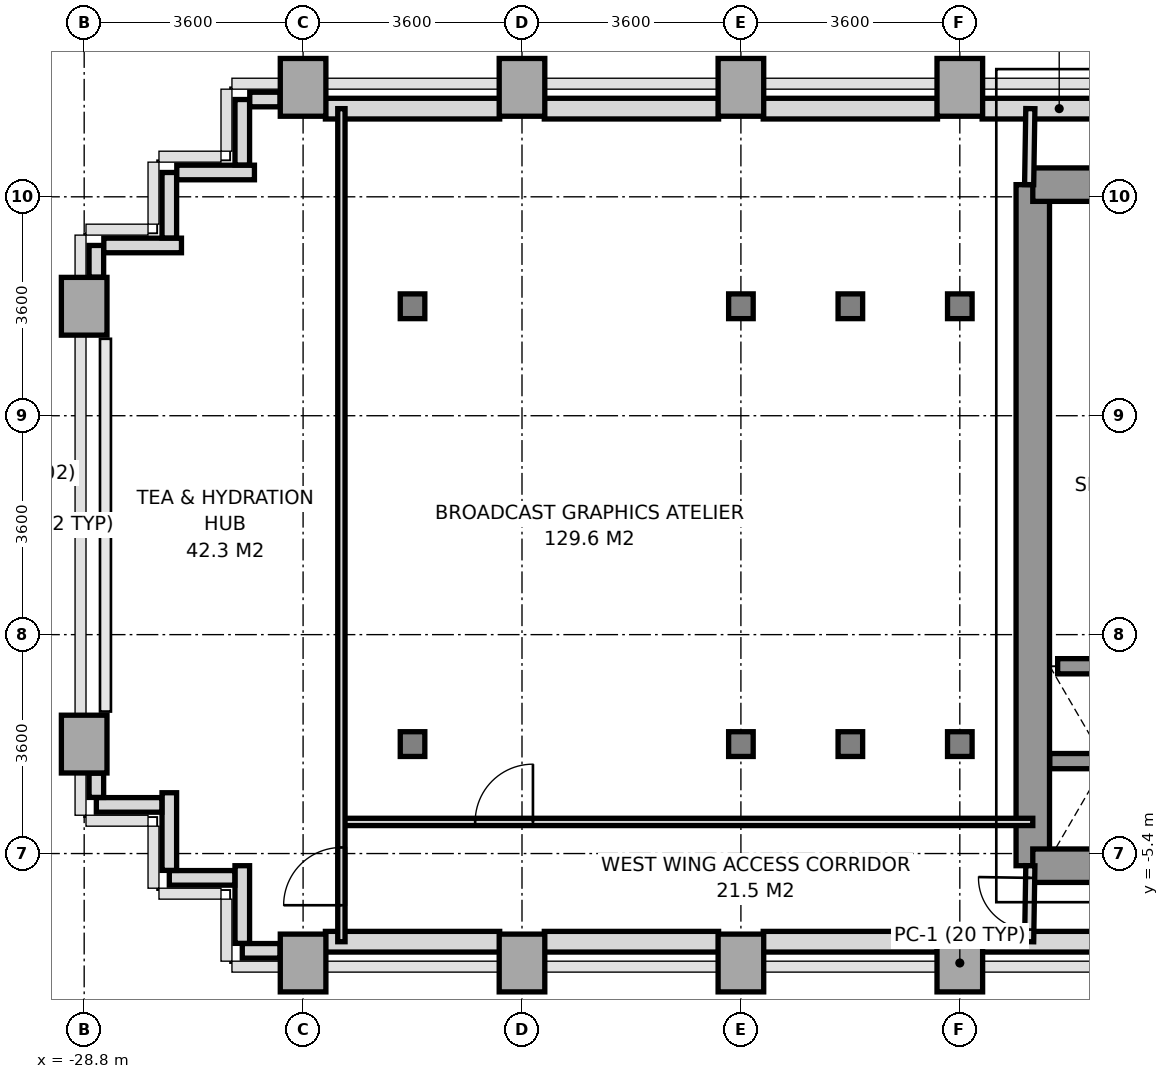
"""IFC4 building model, lengths in metres.
Left out: names, types, materials, properties, quantities, classifications, styles, units other than length and angle.
Written with IfcOpenShell. Run it as: python <this file> out.ifc"""

import sys

from ifc_helpers import new_model, si_unit, direction, frame, frame_2d, origin, origin_2d, place, context, subcontext, project, spatial, rectangle, i_section, extrude, source, transform, mapped, element, fill, save


model = new_model("IFC4")
c1 = context("Model", 3, precision=1e-05, world=origin(), true_north=direction((0.0, 1.0)))
c2 = subcontext(c1, "Body", "Model", "MODEL_VIEW")
j1 = project(units=[si_unit("LENGTHUNIT", "METRE"), si_unit("PLANEANGLEUNIT", "RADIAN")], contexts=[c1])
p1 = place(None, origin())
s1 = spatial("IfcSite", under=j1, at=p1, CompositionType="ELEMENT")
p2 = place(p1, origin())
s2 = spatial("IfcBuilding", under=s1, at=p2, CompositionType="ELEMENT")
p3 = place(p2, frame((0.0, 0.0, 54.4)))
s3 = spatial("IfcBuildingStorey", under=s2, at=p3, CompositionType="ELEMENT", Elevation=54.4)
m1 = source(origin(), c2, "Body", "SweptSolid", [
    extrude(rectangle(XDim=0.75, YDim=0.95, at=origin_2d()), origin(), (0.0, 0.0, 1.0), 3.2),
])
for number, where, z_axis, x_axis in (
    (1, (-28.8, -3.6, 0.0), (0.0, 0.0, 1.0), (1.0, 0.0, 0.0)),
    (2, (-28.8, 3.6, 0.0), (0.0, 0.0, 1.0), (1.0, 0.0, 0.0)),
    (3, (-25.2, -7.2, 0.0), (0.0, 0.0, 1.0), (1.0, 0.0, 0.0)),
    (4, (-25.2, 7.2, 0.0), (0.0, 0.0, 1.0), (1.0, 0.0, 0.0)),
):
    element("IfcColumn", number, at=place(p3, frame(where, z_axis=z_axis, x_axis=x_axis)), inside=s3, PredefinedType="COLUMN", context=c2, shape_type="MappedRepresentation", body=[
        mapped(m1, transform((0.0, 0.0, 0.0), x_axis=(1.0, 0.0, 0.0), y_axis=(0.0, 1.0, 0.0), z_axis=(0.0, 0.0, 1.0), scale=1.0)),
    ])
m2 = source(origin(), c2, "Body", "SweptSolid", [
    extrude(i_section(OverallWidth=0.404, OverallDepth=0.407, WebThickness=0.022, FlangeThickness=0.035, at=origin_2d()), origin(), (0.0, 0.0, 1.0), 3.2),
])
for number, where, z_axis, x_axis in (
    (5, (-23.4, -3.6, 0.0), (0.0, 0.0, 1.0), (1.0, 0.0, 0.0)),
    (6, (-23.4, 3.6, 0.0), (0.0, 0.0, 1.0), (1.0, 0.0, 0.0)),
):
    element("IfcColumn", number, at=place(p3, frame(where, z_axis=z_axis, x_axis=x_axis)), inside=s3, PredefinedType="COLUMN", context=c2, shape_type="MappedRepresentation", body=[
        mapped(m2, transform((0.0, 0.0, 0.0), x_axis=(1.0, 0.0, 0.0), y_axis=(0.0, 1.0, 0.0), z_axis=(0.0, 0.0, 1.0), scale=1.0)),
    ])
for number, where, z_axis, x_axis in (
    (7, (-21.6, -7.2, 0.0), (0.0, 0.0, 1.0), (1.0, 0.0, 0.0)),
    (8, (-21.6, 7.2, 0.0), (0.0, 0.0, 1.0), (1.0, 0.0, 0.0)),
    (9, (-18.0, -7.2, 0.0), (0.0, 0.0, 1.0), (1.0, 0.0, 0.0)),
):
    element("IfcColumn", number, at=place(p3, frame(where, z_axis=z_axis, x_axis=x_axis)), inside=s3, PredefinedType="COLUMN", context=c2, shape_type="MappedRepresentation", body=[
        mapped(m1, transform((0.0, 0.0, 0.0), x_axis=(1.0, 0.0, 0.0), y_axis=(0.0, 1.0, 0.0), z_axis=(0.0, 0.0, 1.0), scale=1.0)),
    ])
for number, where, z_axis, x_axis in (
    (10, (-18.0, -3.6, 0.0), (0.0, 0.0, 1.0), (1.0, 0.0, 0.0)),
    (11, (-18.0, 3.6, 0.0), (0.0, 0.0, 1.0), (1.0, 0.0, 0.0)),
):
    element("IfcColumn", number, at=place(p3, frame(where, z_axis=z_axis, x_axis=x_axis)), inside=s3, PredefinedType="COLUMN", context=c2, shape_type="MappedRepresentation", body=[
        mapped(m2, transform((0.0, 0.0, 0.0), x_axis=(1.0, 0.0, 0.0), y_axis=(0.0, 1.0, 0.0), z_axis=(0.0, 0.0, 1.0), scale=1.0)),
    ])
p4 = place(p3, frame((-18.0, 7.2, 0.0), z_axis=(0.0, 0.0, 1.0), x_axis=(1.0, 0.0, 0.0)))
e12 = element("IfcColumn", 12, at=p4, inside=s3, PredefinedType="COLUMN", context=c2, shape_type="MappedRepresentation", body=[
    mapped(m1, transform((0.0, 0.0, 0.0), x_axis=(1.0, 0.0, 0.0), y_axis=(0.0, 1.0, 0.0), z_axis=(0.0, 0.0, 1.0), scale=1.0)),
])
for number, where, z_axis, x_axis in (
    (13, (-16.2, -3.6, 0.0), (0.0, 0.0, 1.0), (1.0, 0.0, 0.0)),
    (14, (-16.2, 3.6, 0.0), (0.0, 0.0, 1.0), (1.0, 0.0, 0.0)),
):
    element("IfcColumn", number, at=place(p3, frame(where, z_axis=z_axis, x_axis=x_axis)), inside=s3, PredefinedType="COLUMN", context=c2, shape_type="MappedRepresentation", body=[
        mapped(m2, transform((0.0, 0.0, 0.0), x_axis=(1.0, 0.0, 0.0), y_axis=(0.0, 1.0, 0.0), z_axis=(0.0, 0.0, 1.0), scale=1.0)),
    ])
p5 = place(p3, frame((-14.4, -7.2, 0.0), z_axis=(0.0, 0.0, 1.0), x_axis=(1.0, 0.0, 0.0)))
e15 = element("IfcColumn", 15, at=p5, inside=s3, PredefinedType="COLUMN", context=c2, shape_type="MappedRepresentation", body=[
    mapped(m1, transform((0.0, 0.0, 0.0), x_axis=(1.0, 0.0, 0.0), y_axis=(0.0, 1.0, 0.0), z_axis=(0.0, 0.0, 1.0), scale=1.0)),
])
for number, where, z_axis, x_axis in (
    (16, (-14.4, -3.6, 0.0), (0.0, 0.0, 1.0), (1.0, 0.0, 0.0)),
    (17, (-14.4, 3.6, 0.0), (0.0, 0.0, 1.0), (1.0, 0.0, 0.0)),
):
    element("IfcColumn", number, at=place(p3, frame(where, z_axis=z_axis, x_axis=x_axis)), inside=s3, PredefinedType="COLUMN", context=c2, shape_type="MappedRepresentation", body=[
        mapped(m2, transform((0.0, 0.0, 0.0), x_axis=(1.0, 0.0, 0.0), y_axis=(0.0, 1.0, 0.0), z_axis=(0.0, 0.0, 1.0), scale=1.0)),
    ])
p6 = place(p3, frame((-14.4, 7.2, 0.0), z_axis=(0.0, 0.0, 1.0), x_axis=(1.0, 0.0, 0.0)))
e18 = element("IfcColumn", 18, at=p6, inside=s3, PredefinedType="COLUMN", context=c2, shape_type="MappedRepresentation", body=[
    mapped(m1, transform((0.0, 0.0, 0.0), x_axis=(1.0, 0.0, 0.0), y_axis=(0.0, 1.0, 0.0), z_axis=(0.0, 0.0, 1.0), scale=1.0)),
])
for number, where, z_axis, x_axis in (
    (19, (-24.833, 6.85, 0.0), (0.0, 0.0, 1.0), (1.0, 0.0, 0.0)),
    (20, (-21.233, 6.85, 0.0), (0.0, 0.0, 1.0), (1.0, 0.0, 0.0)),
    (21, (-17.633, 6.85, 0.0), (0.0, 0.0, 1.0), (1.0, 0.0, 0.0)),
):
    element("IfcWall", number, at=place(p3, frame(where, z_axis=z_axis, x_axis=x_axis)), inside=s3, PredefinedType="SOLIDWALL", context=c2, shape_type="SweptSolid", body=[
        extrude(rectangle(XDim=2.866, YDim=0.34, at=frame_2d((1.433, 0.0))), origin(), (0.0, 0.0, 1.0), 2.45),
    ])
p7 = place(p3, frame((-14.033, 6.85, 0.0), z_axis=(0.0, 0.0, 1.0), x_axis=(1.0, 0.0, 0.0)))
e22 = element("IfcWall", 22, at=p7, inside=s3, PredefinedType="SOLIDWALL", context=c2, shape_type="SweptSolid", body=[
    extrude(rectangle(XDim=2.535, YDim=0.34, at=frame_2d((1.268, 0.0))), origin(), (0.0, 0.0, 1.0), 3.2),
])
for number, where, z_axis, x_axis in (
    (23, (-24.833, -6.85, 0.0), (0.0, 0.0, 1.0), (1.0, 0.0, 0.0)),
    (24, (-21.233, -6.85, 0.0), (0.0, 0.0, 1.0), (1.0, 0.0, 0.0)),
    (25, (-17.633, -6.85, 0.0), (0.0, 0.0, 1.0), (1.0, 0.0, 0.0)),
):
    element("IfcWall", number, at=place(p3, frame(where, z_axis=z_axis, x_axis=x_axis)), inside=s3, PredefinedType="SOLIDWALL", context=c2, shape_type="SweptSolid", body=[
        extrude(rectangle(XDim=2.866, YDim=0.34, at=frame_2d((1.433, 0.0))), origin(), (0.0, 0.0, 1.0), 2.45),
    ])
p8 = place(p3, frame((-14.033, -6.85, 0.0), z_axis=(0.0, 0.0, 1.0), x_axis=(1.0, 0.0, 0.0)))
e26 = element("IfcWall", 26, at=p8, inside=s3, PredefinedType="SOLIDWALL", context=c2, shape_type="SweptSolid", body=[
    extrude(rectangle(XDim=2.283, YDim=0.34, at=frame_2d((1.142, 0.0))), origin(), (0.0, 0.0, 1.0), 3.2),
])
p9 = place(p3, frame((-25.578, -7.0, 0.0), z_axis=(0.0, 0.0, 1.0), x_axis=(-1.0, 0.0, 0.0)))
e27 = element("IfcWall", 27, at=p9, inside=s3, PredefinedType="PARAPET", context=c2, shape_type="SweptSolid", body=[
    extrude(rectangle(XDim=0.622, YDim=0.24, at=frame_2d((0.311, 0.0))), origin(), (0.0, 0.0, 1.0), 1.15),
])
p10 = place(p3, frame((-26.2, -6.877, 0.0), z_axis=(0.0, 0.0, 1.0), x_axis=(0.0, 1.0, 0.0)))
e28 = element("IfcWall", 28, at=p10, inside=s3, PredefinedType="PARAPET", context=c2, shape_type="SweptSolid", body=[
    extrude(rectangle(XDim=1.277, YDim=0.24, at=frame_2d((0.638, 0.0))), origin(), (0.0, 0.0, 1.0), 1.15),
])
p11 = place(p3, frame((-26.323, -5.8, 0.0), z_axis=(0.0, 0.0, 1.0), x_axis=(-1.0, 0.0, 0.0)))
e29 = element("IfcWall", 29, at=p11, inside=s3, PredefinedType="PARAPET", context=c2, shape_type="SweptSolid", body=[
    extrude(rectangle(XDim=1.077, YDim=0.24, at=frame_2d((0.539, 0.0))), origin(), (0.0, 0.0, 1.0), 1.15),
])
p12 = place(p3, frame((-27.4, -5.677, 0.0), z_axis=(0.0, 0.0, 1.0), x_axis=(0.0, 1.0, 0.0)))
e30 = element("IfcWall", 30, at=p12, inside=s3, PredefinedType="PARAPET", context=c2, shape_type="SweptSolid", body=[
    extrude(rectangle(XDim=1.277, YDim=0.24, at=frame_2d((0.639, 0.0))), origin(), (0.0, 0.0, 1.0), 1.15),
])
p13 = place(p3, frame((-27.523, -4.6, 0.0), z_axis=(0.0, 0.0, 1.0), x_axis=(-1.0, 0.0, 0.0)))
e31 = element("IfcWall", 31, at=p13, inside=s3, PredefinedType="PARAPET", context=c2, shape_type="SweptSolid", body=[
    extrude(rectangle(XDim=1.077, YDim=0.24, at=frame_2d((0.539, 0.0))), origin(), (0.0, 0.0, 1.0), 1.15),
])
p14 = place(p3, frame((-28.6, -4.477, 0.0), z_axis=(0.0, 0.0, 1.0), x_axis=(0.0, 1.0, 0.0)))
e32 = element("IfcWall", 32, at=p14, inside=s3, PredefinedType="PARAPET", context=c2, shape_type="SweptSolid", body=[
    extrude(rectangle(XDim=0.399, YDim=0.24, at=frame_2d((0.2, 0.0))), origin(), (0.0, 0.0, 1.0), 1.15),
])
p15 = place(p3, frame((-28.6, 4.078, 0.0), z_axis=(0.0, 0.0, 1.0), x_axis=(0.0, 1.0, 0.0)))
e33 = element("IfcWall", 33, at=p15, inside=s3, PredefinedType="PARAPET", context=c2, shape_type="SweptSolid", body=[
    extrude(rectangle(XDim=0.522, YDim=0.24, at=frame_2d((0.261, 0.0))), origin(), (0.0, 0.0, 1.0), 1.15),
])
p16 = place(p3, frame((-28.477, 4.6, 0.0), z_axis=(0.0, 0.0, 1.0), x_axis=(1.0, 0.0, 0.0)))
e34 = element("IfcWall", 34, at=p16, inside=s3, PredefinedType="PARAPET", context=c2, shape_type="SweptSolid", body=[
    extrude(rectangle(XDim=1.277, YDim=0.24, at=frame_2d((0.639, 0.0))), origin(), (0.0, 0.0, 1.0), 1.15),
])
p17 = place(p3, frame((-27.4, 4.723, 0.0), z_axis=(0.0, 0.0, 1.0), x_axis=(0.0, 1.0, 0.0)))
e35 = element("IfcWall", 35, at=p17, inside=s3, PredefinedType="PARAPET", context=c2, shape_type="SweptSolid", body=[
    extrude(rectangle(XDim=1.077, YDim=0.24, at=frame_2d((0.539, 0.0))), origin(), (0.0, 0.0, 1.0), 1.15),
])
p18 = place(p3, frame((-27.277, 5.8, 0.0), z_axis=(0.0, 0.0, 1.0), x_axis=(1.0, 0.0, 0.0)))
e36 = element("IfcWall", 36, at=p18, inside=s3, PredefinedType="PARAPET", context=c2, shape_type="SweptSolid", body=[
    extrude(rectangle(XDim=1.277, YDim=0.24, at=frame_2d((0.639, 0.0))), origin(), (0.0, 0.0, 1.0), 1.15),
])
p19 = place(p3, frame((-26.2, 5.923, 0.0), z_axis=(0.0, 0.0, 1.0), x_axis=(0.0, 1.0, 0.0)))
e37 = element("IfcWall", 37, at=p19, inside=s3, PredefinedType="PARAPET", context=c2, shape_type="SweptSolid", body=[
    extrude(rectangle(XDim=1.077, YDim=0.24, at=frame_2d((0.539, 0.0))), origin(), (0.0, 0.0, 1.0), 1.15),
])
p20 = place(p3, frame((-26.077, 7.0, 0.0), z_axis=(0.0, 0.0, 1.0), x_axis=(1.0, 0.0, 0.0)))
e38 = element("IfcWall", 38, at=p20, inside=s3, PredefinedType="PARAPET", context=c2, shape_type="SweptSolid", body=[
    extrude(rectangle(XDim=0.499, YDim=0.24, at=frame_2d((0.25, 0.0))), origin(), (0.0, 0.0, 1.0), 1.15),
])
p21 = place(p3, frame((-13.2, -5.6, 0.0), z_axis=(0.0, 0.0, 1.0), x_axis=(0.0, 1.0, 0.0)))
e39 = element("IfcWall", 39, at=p21, inside=s3, PredefinedType="SHEAR", context=c2, shape_type="SweptSolid", body=[
    extrude(rectangle(XDim=11.2, YDim=0.55, at=frame_2d((5.6, 0.0))), origin(), (0.0, 0.0, 1.0), 3.2),
])
p22 = place(p3, frame((-13.2, 5.6, 0.0), z_axis=(0.0, 0.0, 1.0), x_axis=(1.0, 0.0, 0.0)))
e40 = element("IfcWall", 40, at=p22, inside=s3, PredefinedType="SHEAR", context=c2, shape_type="SweptSolid", body=[
    extrude(rectangle(XDim=1.819, YDim=0.55, at=frame_2d((0.909, 0.0))), origin(), (0.0, 0.0, 1.0), 3.2),
])
p23 = place(p3, frame((-13.2, -5.6, 0.0), z_axis=(0.0, 0.0, 1.0), x_axis=(1.0, 0.0, 0.0)))
e41 = element("IfcWall", 41, at=p23, inside=s3, PredefinedType="SHEAR", context=c2, shape_type="SweptSolid", body=[
    extrude(rectangle(XDim=7.8, YDim=0.55, at=frame_2d((3.9, 0.0))), origin(), (0.0, 0.0, 1.0), 3.2),
])
p24 = place(p23, frame((3.6, 0.0, 0.0)))
e42 = element("IfcOpeningElement", 42, at=p24, cuts=e41, PredefinedType="OPENING", context=c2, shape_type="SweptSolid", body=[
    extrude(rectangle(XDim=1.2, YDim=2.2, at=frame_2d((0.6, 1.1))), frame((0.0, 0.285, 0.0), z_axis=(0.0, -1.0, 0.0), x_axis=(1.0, 0.0, 0.0)), (0.0, 0.0, 1.0), 0.57),
])
p25 = place(p3, frame((-12.92, -3.88, 0.0), z_axis=(0.0, 0.0, 1.0), x_axis=(1.0, 0.0, 0.0)))
e43 = element("IfcWall", 43, at=p25, inside=s3, PredefinedType="SOLIDWALL", context=c2, shape_type="SweptSolid", body=[
    extrude(rectangle(XDim=1.84, YDim=0.25, at=frame_2d((0.92, 0.0))), origin(), (0.0, 0.0, 1.0), 3.2),
])
p26 = place(p3, frame((-12.791, -2.32, 0.0), z_axis=(0.0, 0.0, 1.0), x_axis=(1.0, 0.0, 0.0)))
e44 = element("IfcWall", 44, at=p26, inside=s3, PredefinedType="SOLIDWALL", context=c2, shape_type="SweptSolid", body=[
    extrude(rectangle(XDim=1.582, YDim=0.25, at=frame_2d((0.791, 0.0))), origin(), (0.0, 0.0, 1.0), 3.2),
])
p27 = place(p3, frame((-13.26, 5.6, 0.0), z_axis=(0.0, 0.0, 1.0), x_axis=(0.016013571389, 0.999871774545, 0.0)))
e45 = element("IfcWall", 45, at=p27, inside=s3, PredefinedType="PARTITIONING", context=c2, shape_type="SweptSolid", body=[
    extrude(rectangle(XDim=1.25, YDim=0.15, at=frame_2d((0.625, 0.0))), origin(), (0.0, 0.0, 1.0), 3.2),
])
p28 = place(p3, frame((-13.26, -6.85, 0.0), z_axis=(0.0, 0.0, 1.0), x_axis=(0.016013571389, 0.999871774545, 0.0)))
e46 = element("IfcWall", 46, at=p28, inside=s3, PredefinedType="PARTITIONING", context=c2, shape_type="SweptSolid", body=[
    extrude(rectangle(XDim=1.25, YDim=0.15, at=frame_2d((0.625, 0.0))), origin(), (0.0, 0.0, 1.0), 3.2),
])
p29 = place(p28, frame((0.2, 0.0, 0.0)))
e47 = element("IfcOpeningElement", 47, at=p29, cuts=e46, PredefinedType="OPENING", context=c2, shape_type="SweptSolid", body=[
    extrude(rectangle(XDim=0.85, YDim=2.1, at=frame_2d((0.425, 1.05))), frame((0.0, 0.085, 0.0), z_axis=(0.0, -1.0, 0.0), x_axis=(1.0, 0.0, 0.0)), (0.0, 0.0, 1.0), 0.17),
])
p30 = place(p3, frame((-24.57, -4.88, 0.0), z_axis=(0.0, 0.0, 1.0), x_axis=(1.0, 0.0, 0.0)))
e48 = element("IfcWall", 48, at=p30, inside=s3, PredefinedType="PARTITIONING", context=c2, shape_type="SweptSolid", body=[
    extrude(rectangle(XDim=11.37, YDim=0.12, at=frame_2d((5.685, 0.0))), origin(), (0.0, 0.0, 1.0), 2.7),
])
p31 = place(p30, frame((2.2, 0.0, 0.0)))
e49 = element("IfcOpeningElement", 49, at=p31, cuts=e48, PredefinedType="OPENING", context=c2, shape_type="SweptSolid", body=[
    extrude(rectangle(XDim=0.95, YDim=2.15, at=frame_2d((0.475, 1.075))), frame((0.0, 0.07, 0.0), z_axis=(0.0, -1.0, 0.0), x_axis=(1.0, 0.0, 0.0)), (0.0, 0.0, 1.0), 0.14),
])
p32 = place(p3, frame((-24.57, -6.85, 0.0), z_axis=(0.0, 0.0, 1.0), x_axis=(0.0, 1.0, 0.0)))
e50 = element("IfcWall", 50, at=p32, inside=s3, PredefinedType="PARTITIONING", context=c2, shape_type="SweptSolid", body=[
    extrude(rectangle(XDim=13.7, YDim=0.12, at=frame_2d((6.85, 0.0))), origin(), (0.0, 0.0, 1.0), 2.71),
])
p33 = place(p32, frame((0.6, 0.0, 0.0)))
e51 = element("IfcOpeningElement", 51, at=p33, cuts=e50, PredefinedType="OPENING", context=c2, shape_type="SweptSolid", body=[
    extrude(rectangle(XDim=0.95, YDim=2.15, at=frame_2d((0.475, 1.075))), frame((0.0, 0.07, 0.0), z_axis=(0.0, -1.0, 0.0), x_axis=(1.0, 0.0, 0.0)), (0.0, 0.0, 1.0), 0.14),
])
m3 = source(origin(), c2, "Body", "SweptSolid", [
    extrude(rectangle(XDim=0.95, YDim=2.15, at=frame_2d((0.475, 1.075))), frame((0.0, 0.025, 0.0), z_axis=(0.0, -1.0, 0.0), x_axis=(1.0, 0.0, 0.0)), (0.0, 0.0, 1.0), 0.05),
])
p34 = place(p31, origin())
e52 = element("IfcDoor", 52, at=p34, inside=s3, OperationType="SINGLE_SWING_RIGHT", PredefinedType="DOOR", context=c2, shape_type="MappedRepresentation", body=[
    mapped(m3, transform((0.0, 0.0, 0.0), x_axis=(1.0, 0.0, 0.0), y_axis=(0.0, 1.0, 0.0), z_axis=(0.0, 0.0, 1.0), scale=1.0)),
])
fill(e49, e52)
p35 = place(p33, origin())
e53 = element("IfcDoor", 53, at=p35, inside=s3, OperationType="SINGLE_SWING_LEFT", PredefinedType="DOOR", context=c2, shape_type="MappedRepresentation", body=[
    mapped(m3, transform((0.0, 0.0, 0.0), x_axis=(1.0, 0.0, 0.0), y_axis=(0.0, 1.0, 0.0), z_axis=(0.0, 0.0, 1.0), scale=1.0)),
])
fill(e51, e53)
m4 = source(origin(), c2, "Body", "SweptSolid", [
    extrude(rectangle(XDim=0.85, YDim=2.1, at=frame_2d((0.425, 1.05))), frame((0.0, 0.025, 0.0), z_axis=(0.0, -1.0, 0.0), x_axis=(1.0, 0.0, 0.0)), (0.0, 0.0, 1.0), 0.05),
])
p36 = place(p29, origin())
e54 = element("IfcDoor", 54, at=p36, inside=s3, OperationType="SINGLE_SWING_RIGHT", PredefinedType="DOOR", context=c2, shape_type="MappedRepresentation", body=[
    mapped(m4, transform((0.0, 0.0, 0.0), x_axis=(1.0, 0.0, 0.0), y_axis=(0.0, 1.0, 0.0), z_axis=(0.0, 0.0, 1.0), scale=1.0)),
])
fill(e47, e54)
save(model, sys.argv[1])
